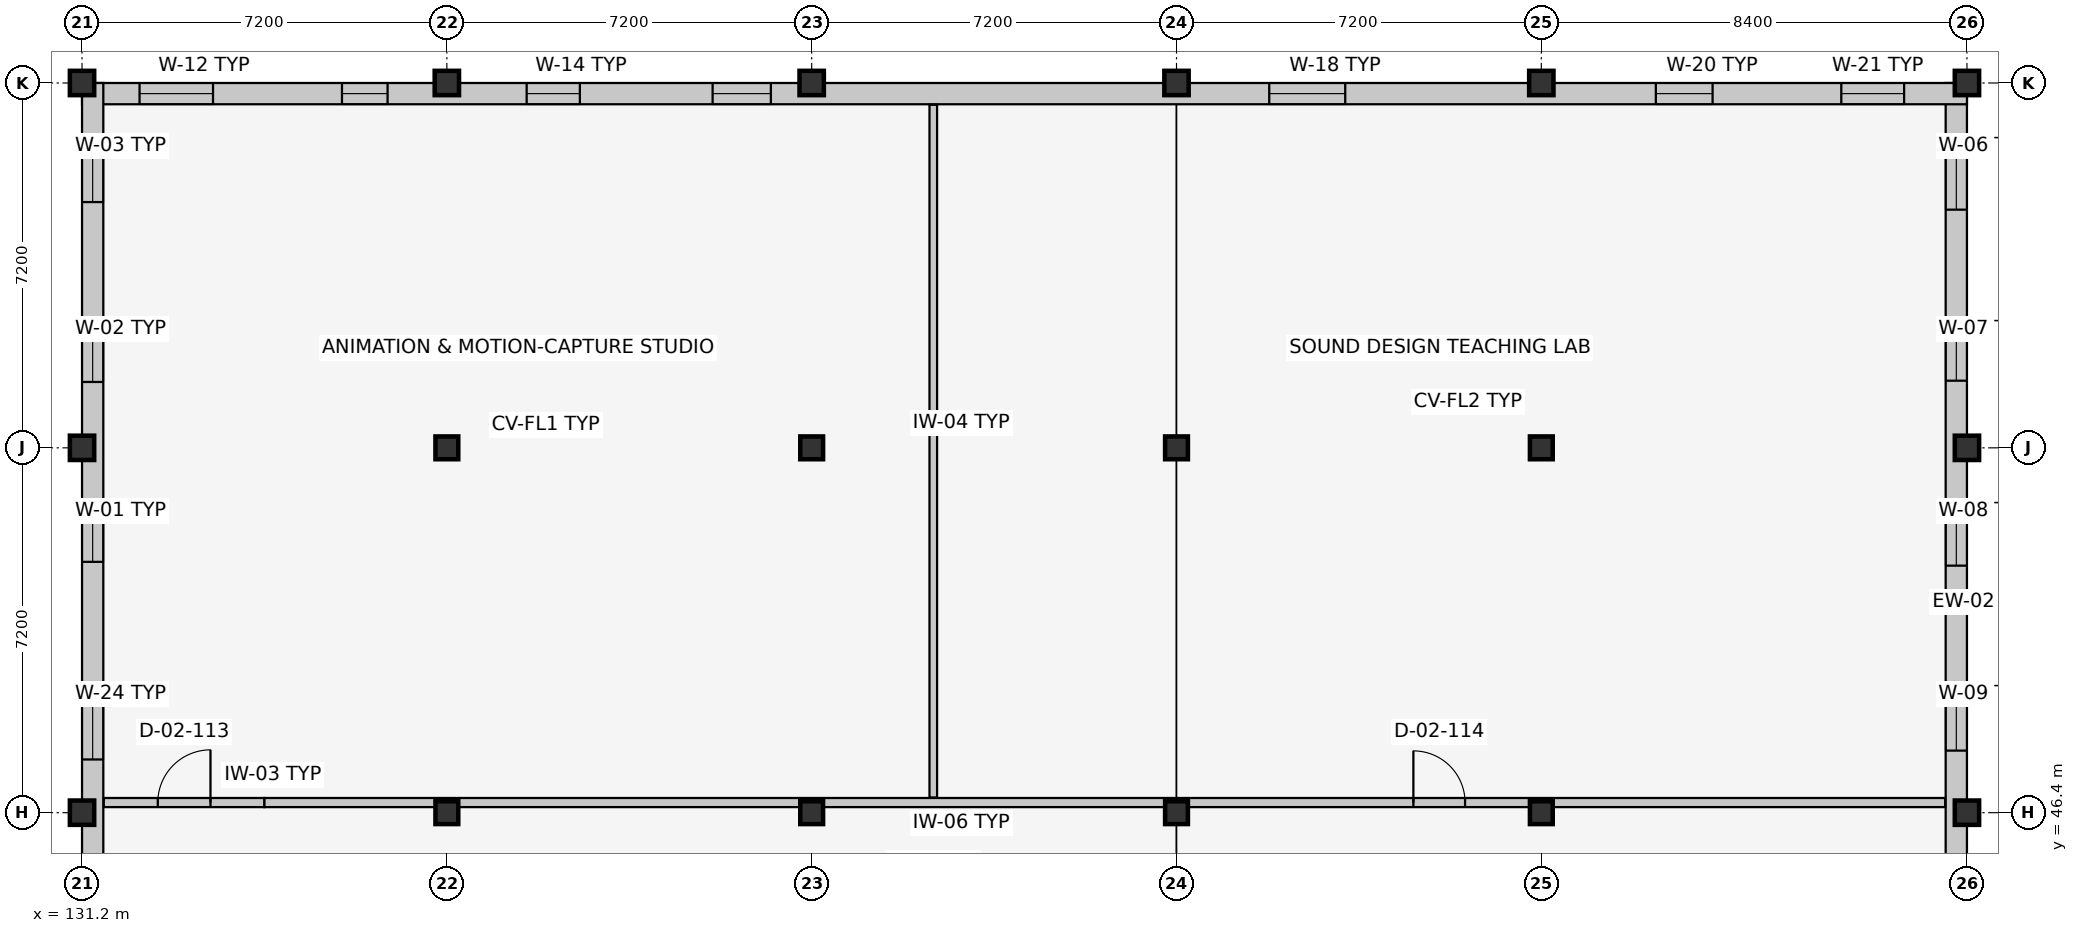
"""IFC4 building model, lengths in metres.
Left out: names, types, materials, properties, quantities, classifications, styles, units other than length and angle.
Written with IfcOpenShell. Run it as: python <this file> out.ifc"""

import sys

from ifc_helpers import new_model, si_unit, direction, frame, frame_2d, origin, origin_2d, place, context, subcontext, project, spatial, rectangle, extrude, element, fill, save


model = new_model("IFC4")
c1 = context("Model", 3, precision=1e-05, world=origin(), true_north=direction((0.0, 1.0)))
c2 = subcontext(c1, "Body", "Model", "MODEL_VIEW")
j1 = project(units=[si_unit("LENGTHUNIT", "METRE"), si_unit("PLANEANGLEUNIT", "RADIAN")], contexts=[c1])
p1 = place(None, origin())
s1 = spatial("IfcSite", under=j1, at=p1, CompositionType="ELEMENT")
p2 = place(p1, origin())
s2 = spatial("IfcBuilding", under=s1, at=p2, CompositionType="ELEMENT")
p3 = place(p2, frame((0.0, 0.0, 9.6)))
s3 = spatial("IfcBuildingStorey", under=s2, at=p3, CompositionType="ELEMENT", Elevation=9.6)
for number, where, z_axis, x_axis in (
    (1, (131.2, 46.4, 0.0), (0.0, 0.0, 1.0), (1.0, 0.0, 0.0)),
    (2, (131.2, 53.6, 0.0), (0.0, 0.0, 1.0), (1.0, 0.0, 0.0)),
    (3, (131.2, 60.8, 0.0), (0.0, 0.0, 1.0), (1.0, 0.0, 0.0)),
):
    element("IfcColumn", number, at=place(p3, frame(where, z_axis=z_axis, x_axis=x_axis)), inside=s3, PredefinedType="COLUMN", context=c2, shape_type="SweptSolid", body=[
        extrude(rectangle(XDim=0.48, YDim=0.48, at=origin_2d()), origin(), (0.0, 0.0, 1.0), 4.2),
    ])
for number, where, z_axis, x_axis in (
    (4, (138.4, 46.4, 0.0), (0.0, 0.0, 1.0), (1.0, 0.0, 0.0)),
    (5, (138.4, 53.6, 0.0), (0.0, 0.0, 1.0), (1.0, 0.0, 0.0)),
):
    element("IfcColumn", number, at=place(p3, frame(where, z_axis=z_axis, x_axis=x_axis)), inside=s3, PredefinedType="COLUMN", context=c2, shape_type="SweptSolid", body=[
        extrude(rectangle(XDim=0.45, YDim=0.45, at=origin_2d()), origin(), (0.0, 0.0, 1.0), 4.2),
    ])
p4 = place(p3, frame((138.4, 60.8, 0.0), z_axis=(0.0, 0.0, 1.0), x_axis=(1.0, 0.0, 0.0)))
e6 = element("IfcColumn", 6, at=p4, inside=s3, PredefinedType="COLUMN", context=c2, shape_type="SweptSolid", body=[
    extrude(rectangle(XDim=0.48, YDim=0.48, at=origin_2d()), origin(), (0.0, 0.0, 1.0), 4.2),
])
for number, where, z_axis, x_axis in (
    (7, (145.6, 46.4, 0.0), (0.0, 0.0, 1.0), (1.0, 0.0, 0.0)),
    (8, (145.6, 53.6, 0.0), (0.0, 0.0, 1.0), (1.0, 0.0, 0.0)),
):
    element("IfcColumn", number, at=place(p3, frame(where, z_axis=z_axis, x_axis=x_axis)), inside=s3, PredefinedType="COLUMN", context=c2, shape_type="SweptSolid", body=[
        extrude(rectangle(XDim=0.45, YDim=0.45, at=origin_2d()), origin(), (0.0, 0.0, 1.0), 4.2),
    ])
p5 = place(p3, frame((145.6, 60.8, 0.0), z_axis=(0.0, 0.0, 1.0), x_axis=(1.0, 0.0, 0.0)))
e9 = element("IfcColumn", 9, at=p5, inside=s3, PredefinedType="COLUMN", context=c2, shape_type="SweptSolid", body=[
    extrude(rectangle(XDim=0.48, YDim=0.48, at=origin_2d()), origin(), (0.0, 0.0, 1.0), 4.2),
])
for number, where, z_axis, x_axis in (
    (10, (152.8, 46.4, 0.0), (0.0, 0.0, 1.0), (1.0, 0.0, 0.0)),
    (11, (152.8, 53.6, 0.0), (0.0, 0.0, 1.0), (1.0, 0.0, 0.0)),
):
    element("IfcColumn", number, at=place(p3, frame(where, z_axis=z_axis, x_axis=x_axis)), inside=s3, PredefinedType="COLUMN", context=c2, shape_type="SweptSolid", body=[
        extrude(rectangle(XDim=0.45, YDim=0.45, at=origin_2d()), origin(), (0.0, 0.0, 1.0), 4.2),
    ])
p6 = place(p3, frame((152.8, 60.8, 0.0), z_axis=(0.0, 0.0, 1.0), x_axis=(1.0, 0.0, 0.0)))
e12 = element("IfcColumn", 12, at=p6, inside=s3, PredefinedType="COLUMN", context=c2, shape_type="SweptSolid", body=[
    extrude(rectangle(XDim=0.48, YDim=0.48, at=origin_2d()), origin(), (0.0, 0.0, 1.0), 4.2),
])
for number, where, z_axis, x_axis in (
    (13, (160.0, 46.4, 0.0), (0.0, 0.0, 1.0), (1.0, 0.0, 0.0)),
    (14, (160.0, 53.6, 0.0), (0.0, 0.0, 1.0), (1.0, 0.0, 0.0)),
):
    element("IfcColumn", number, at=place(p3, frame(where, z_axis=z_axis, x_axis=x_axis)), inside=s3, PredefinedType="COLUMN", context=c2, shape_type="SweptSolid", body=[
        extrude(rectangle(XDim=0.45, YDim=0.45, at=origin_2d()), origin(), (0.0, 0.0, 1.0), 4.2),
    ])
for number, where, z_axis, x_axis in (
    (15, (160.0, 60.8, 0.0), (0.0, 0.0, 1.0), (1.0, 0.0, 0.0)),
    (16, (168.4, 46.4, 0.0), (0.0, 0.0, 1.0), (1.0, 0.0, 0.0)),
    (17, (168.4, 53.6, 0.0), (0.0, 0.0, 1.0), (1.0, 0.0, 0.0)),
    (18, (168.4, 60.8, 0.0), (0.0, 0.0, 1.0), (1.0, 0.0, 0.0)),
):
    element("IfcColumn", number, at=place(p3, frame(where, z_axis=z_axis, x_axis=x_axis)), inside=s3, PredefinedType="COLUMN", context=c2, shape_type="SweptSolid", body=[
        extrude(rectangle(XDim=0.48, YDim=0.48, at=origin_2d()), origin(), (0.0, 0.0, 1.0), 4.2),
    ])
p7 = place(p3, frame((168.19, 60.8, 0.0), z_axis=(0.0, 0.0, 1.0), x_axis=(0.0, -1.0, 0.0)))
e19 = element("IfcWall", 19, at=p7, inside=s3, PredefinedType="SOLIDWALL", context=c2, shape_type="SweptSolid", body=[
    extrude(rectangle(XDim=21.6, YDim=0.42, at=frame_2d((10.8, 0.0))), origin(), (0.0, 0.0, 1.0), 3.355),
])
p8 = place(p7, frame((1.1, 0.0, 0.9)))
e20 = element("IfcOpeningElement", 20, at=p8, cuts=e19, PredefinedType="OPENING", context=c2, shape_type="SweptSolid", body=[
    extrude(rectangle(XDim=1.4, YDim=1.35, at=frame_2d((0.7, 0.675))), frame((0.0, 0.222, 0.0), z_axis=(0.0, -1.0, 0.0), x_axis=(1.0, 0.0, 0.0)), (0.0, 0.0, 1.0), 0.444),
])
p9 = place(p7, frame((4.925, 0.0, 0.9)))
e21 = element("IfcOpeningElement", 21, at=p9, cuts=e19, PredefinedType="OPENING", context=c2, shape_type="SweptSolid", body=[
    extrude(rectangle(XDim=0.95, YDim=1.45, at=frame_2d((0.475, 0.725))), frame((0.0, 0.222, 0.0), z_axis=(0.0, -1.0, 0.0), x_axis=(1.0, 0.0, 0.0)), (0.0, 0.0, 1.0), 0.444),
])
p10 = place(p7, frame((8.475, 0.0, 0.9)))
e22 = element("IfcOpeningElement", 22, at=p10, cuts=e19, PredefinedType="OPENING", context=c2, shape_type="SweptSolid", body=[
    extrude(rectangle(XDim=1.05, YDim=1.45, at=frame_2d((0.525, 0.725))), frame((0.0, 0.222, 0.0), z_axis=(0.0, -1.0, 0.0), x_axis=(1.0, 0.0, 0.0)), (0.0, 0.0, 1.0), 0.444),
])
p11 = place(p7, frame((12.025, 0.0, 0.9)))
e23 = element("IfcOpeningElement", 23, at=p11, cuts=e19, PredefinedType="OPENING", context=c2, shape_type="SweptSolid", body=[
    extrude(rectangle(XDim=1.15, YDim=1.45, at=frame_2d((0.575, 0.725))), frame((0.0, 0.222, 0.0), z_axis=(0.0, -1.0, 0.0), x_axis=(1.0, 0.0, 0.0)), (0.0, 0.0, 1.0), 0.444),
])
p12 = place(p7, frame((19.125, 0.0, 0.9)))
e24 = element("IfcOpeningElement", 24, at=p12, cuts=e19, PredefinedType="OPENING", context=c2, shape_type="SweptSolid", body=[
    extrude(rectangle(XDim=1.35, YDim=1.45, at=frame_2d((0.675, 0.725))), frame((0.0, 0.222, 0.0), z_axis=(0.0, -1.0, 0.0), x_axis=(1.0, 0.0, 0.0)), (0.0, 0.0, 1.0), 0.444),
])
p13 = place(p3, frame((131.2, 60.59, 0.0), z_axis=(0.0, 0.0, 1.0), x_axis=(1.0, 0.0, 0.0)))
e25 = element("IfcWall", 25, at=p13, inside=s3, PredefinedType="SOLIDWALL", context=c2, shape_type="SweptSolid", body=[
    extrude(rectangle(XDim=37.2, YDim=0.42, at=frame_2d((18.6, 0.0))), origin(), (0.0, 0.0, 1.0), 3.115),
])
p14 = place(p13, frame((1.135, 0.0, 0.9)))
e26 = element("IfcOpeningElement", 26, at=p14, cuts=e25, PredefinedType="OPENING", context=c2, shape_type="SweptSolid", body=[
    extrude(rectangle(XDim=1.45, YDim=1.45, at=frame_2d((0.725, 0.725))), frame((0.0, 0.222, 0.0), z_axis=(0.0, -1.0, 0.0), x_axis=(1.0, 0.0, 0.0)), (0.0, 0.0, 1.0), 0.444),
])
p15 = place(p13, frame((5.13, 0.0, 0.9)))
e27 = element("IfcOpeningElement", 27, at=p15, cuts=e25, PredefinedType="OPENING", context=c2, shape_type="SweptSolid", body=[
    extrude(rectangle(XDim=0.9, YDim=1.6, at=frame_2d((0.45, 0.8))), frame((0.0, 0.222, 0.0), z_axis=(0.0, -1.0, 0.0), x_axis=(1.0, 0.0, 0.0)), (0.0, 0.0, 1.0), 0.444),
])
p16 = place(p13, frame((8.775, 0.0, 0.9)))
e28 = element("IfcOpeningElement", 28, at=p16, cuts=e25, PredefinedType="OPENING", context=c2, shape_type="SweptSolid", body=[
    extrude(rectangle(XDim=1.05, YDim=1.6, at=frame_2d((0.525, 0.8))), frame((0.0, 0.222, 0.0), z_axis=(0.0, -1.0, 0.0), x_axis=(1.0, 0.0, 0.0)), (0.0, 0.0, 1.0), 0.444),
])
p17 = place(p13, frame((12.445, 0.0, 0.9)))
e29 = element("IfcOpeningElement", 29, at=p17, cuts=e25, PredefinedType="OPENING", context=c2, shape_type="SweptSolid", body=[
    extrude(rectangle(XDim=1.15, YDim=1.6, at=frame_2d((0.575, 0.8))), frame((0.0, 0.222, 0.0), z_axis=(0.0, -1.0, 0.0), x_axis=(1.0, 0.0, 0.0)), (0.0, 0.0, 1.0), 0.444),
])
p18 = place(p13, frame((23.43, 0.0, 0.9)))
e30 = element("IfcOpeningElement", 30, at=p18, cuts=e25, PredefinedType="OPENING", context=c2, shape_type="SweptSolid", body=[
    extrude(rectangle(XDim=1.5, YDim=1.6, at=frame_2d((0.75, 0.8))), frame((0.0, 0.222, 0.0), z_axis=(0.0, -1.0, 0.0), x_axis=(1.0, 0.0, 0.0)), (0.0, 0.0, 1.0), 0.444),
])
p19 = place(p13, frame((31.06, 0.0, 0.9)))
e31 = element("IfcOpeningElement", 31, at=p19, cuts=e25, PredefinedType="OPENING", context=c2, shape_type="SweptSolid", body=[
    extrude(rectangle(XDim=1.12, YDim=1.75, at=frame_2d((0.56, 0.875))), frame((0.0, 0.222, 0.0), z_axis=(0.0, -1.0, 0.0), x_axis=(1.0, 0.0, 0.0)), (0.0, 0.0, 1.0), 0.444),
])
p20 = place(p13, frame((34.72, 0.0, 0.9)))
e32 = element("IfcOpeningElement", 32, at=p20, cuts=e25, PredefinedType="OPENING", context=c2, shape_type="SweptSolid", body=[
    extrude(rectangle(XDim=1.24, YDim=1.75, at=frame_2d((0.62, 0.875))), frame((0.0, 0.222, 0.0), z_axis=(0.0, -1.0, 0.0), x_axis=(1.0, 0.0, 0.0)), (0.0, 0.0, 1.0), 0.444),
])
p21 = place(p3, frame((131.41, 39.2, 0.0), z_axis=(0.0, 0.0, 1.0), x_axis=(0.0, 1.0, 0.0)))
e33 = element("IfcWall", 33, at=p21, inside=s3, PredefinedType="SOLIDWALL", context=c2, shape_type="SweptSolid", body=[
    extrude(rectangle(XDim=21.6, YDim=0.42, at=frame_2d((10.8, 0.0))), origin(), (0.0, 0.0, 1.0), 3.355),
])
p22 = place(p21, frame((1.13, 0.0, 0.9)))
e34 = element("IfcOpeningElement", 34, at=p22, cuts=e33, PredefinedType="OPENING", context=c2, shape_type="SweptSolid", body=[
    extrude(rectangle(XDim=1.34, YDim=1.75, at=frame_2d((0.67, 0.875))), frame((0.0, 0.222, 0.0), z_axis=(0.0, -1.0, 0.0), x_axis=(1.0, 0.0, 0.0)), (0.0, 0.0, 1.0), 0.444),
])
p23 = place(p21, frame((4.68, 0.0, 0.9)))
e35 = element("IfcOpeningElement", 35, at=p23, cuts=e33, PredefinedType="OPENING", context=c2, shape_type="SweptSolid", body=[
    extrude(rectangle(XDim=1.44, YDim=1.75, at=frame_2d((0.72, 0.875))), frame((0.0, 0.222, 0.0), z_axis=(0.0, -1.0, 0.0), x_axis=(1.0, 0.0, 0.0)), (0.0, 0.0, 1.0), 0.444),
])
p24 = place(p21, frame((8.25, 0.0, 0.9)))
e36 = element("IfcOpeningElement", 36, at=p24, cuts=e33, PredefinedType="OPENING", context=c2, shape_type="SweptSolid", body=[
    extrude(rectangle(XDim=1.5, YDim=1.75, at=frame_2d((0.75, 0.875))), frame((0.0, 0.222, 0.0), z_axis=(0.0, -1.0, 0.0), x_axis=(1.0, 0.0, 0.0)), (0.0, 0.0, 1.0), 0.444),
])
p25 = place(p21, frame((12.15, 0.0, 0.9)))
e37 = element("IfcOpeningElement", 37, at=p25, cuts=e33, PredefinedType="OPENING", context=c2, shape_type="SweptSolid", body=[
    extrude(rectangle(XDim=0.9, YDim=1.35, at=frame_2d((0.45, 0.675))), frame((0.0, 0.222, 0.0), z_axis=(0.0, -1.0, 0.0), x_axis=(1.0, 0.0, 0.0)), (0.0, 0.0, 1.0), 0.444),
])
p26 = place(p21, frame((15.7, 0.0, 0.9)))
e38 = element("IfcOpeningElement", 38, at=p26, cuts=e33, PredefinedType="OPENING", context=c2, shape_type="SweptSolid", body=[
    extrude(rectangle(XDim=1.0, YDim=1.35, at=frame_2d((0.5, 0.675))), frame((0.0, 0.222, 0.0), z_axis=(0.0, -1.0, 0.0), x_axis=(1.0, 0.0, 0.0)), (0.0, 0.0, 1.0), 0.444),
])
p27 = place(p21, frame((19.25, 0.0, 0.9)))
e39 = element("IfcOpeningElement", 39, at=p27, cuts=e33, PredefinedType="OPENING", context=c2, shape_type="SweptSolid", body=[
    extrude(rectangle(XDim=1.1, YDim=1.35, at=frame_2d((0.55, 0.675))), frame((0.0, 0.222, 0.0), z_axis=(0.0, -1.0, 0.0), x_axis=(1.0, 0.0, 0.0)), (0.0, 0.0, 1.0), 0.444),
])
p28 = place(p3, frame((131.63, 46.6, 0.0), z_axis=(0.0, 0.0, 1.0), x_axis=(1.0, 0.0, 0.0)))
e40 = element("IfcWall", 40, at=p28, inside=s3, PredefinedType="PARTITIONING", context=c2, shape_type="SweptSolid", body=[
    extrude(rectangle(XDim=3.17, YDim=0.18, at=frame_2d((1.585, 0.0))), origin(), (0.0, 0.0, 1.0), 3.285),
])
p29 = place(p28, frame((1.065, 0.0, 0.0)))
e41 = element("IfcOpeningElement", 41, at=p29, cuts=e40, PredefinedType="OPENING", context=c2, shape_type="SweptSolid", body=[
    extrude(rectangle(XDim=1.04, YDim=2.15, at=frame_2d((0.52, 1.075))), frame((0.0, 0.102, 0.0), z_axis=(0.0, -1.0, 0.0), x_axis=(1.0, 0.0, 0.0)), (0.0, 0.0, 1.0), 0.204),
])
p30 = place(p3, frame((134.8, 46.6, 0.0), z_axis=(0.0, 0.0, 1.0), x_axis=(1.0, 0.0, 0.0)))
e42 = element("IfcWall", 42, at=p30, inside=s3, PredefinedType="PARTITIONING", context=c2, shape_type="SweptSolid", body=[
    extrude(rectangle(XDim=33.17, YDim=0.18, at=frame_2d((16.585, 0.0))), origin(), (0.0, 0.0, 1.0), 2.835),
])
p31 = place(p30, frame((22.675, 0.0, 0.0)))
e43 = element("IfcOpeningElement", 43, at=p31, cuts=e42, PredefinedType="OPENING", context=c2, shape_type="SweptSolid", body=[
    extrude(rectangle(XDim=1.02, YDim=2.12, at=frame_2d((0.51, 1.06))), frame((0.0, 0.102, 0.0), z_axis=(0.0, -1.0, 0.0), x_axis=(1.0, 0.0, 0.0)), (0.0, 0.0, 1.0), 0.204),
])
p32 = place(p3, frame((148.0, 46.7, 0.0), z_axis=(0.0, 0.0, 1.0), x_axis=(0.0, 1.0, 0.0)))
e44 = element("IfcWall", 44, at=p32, inside=s3, PredefinedType="PARTITIONING", context=c2, shape_type="SweptSolid", body=[
    extrude(rectangle(XDim=13.67, YDim=0.15, at=frame_2d((6.835, 0.0))), origin(), (0.0, 0.0, 1.0), 3.96),
])
p33 = place(p8, origin())
e45 = element("IfcWindow", 45, at=p33, inside=s3, PartitioningType="SINGLE_PANEL", PredefinedType="WINDOW", context=c2, shape_type="SweptSolid", body=[
    extrude(rectangle(XDim=1.4, YDim=1.35, at=frame_2d((0.7, 0.675))), frame((0.0, 0.03, 0.0), z_axis=(0.0, -1.0, 0.0), x_axis=(1.0, 0.0, 0.0)), (0.0, 0.0, 1.0), 0.06),
])
fill(e20, e45)
p34 = place(p9, origin())
e46 = element("IfcWindow", 46, at=p34, inside=s3, PartitioningType="SINGLE_PANEL", PredefinedType="WINDOW", context=c2, shape_type="SweptSolid", body=[
    extrude(rectangle(XDim=0.95, YDim=1.45, at=frame_2d((0.475, 0.725))), frame((0.0, 0.03, 0.0), z_axis=(0.0, -1.0, 0.0), x_axis=(1.0, 0.0, 0.0)), (0.0, 0.0, 1.0), 0.06),
])
fill(e21, e46)
p35 = place(p10, origin())
e47 = element("IfcWindow", 47, at=p35, inside=s3, PartitioningType="SINGLE_PANEL", PredefinedType="WINDOW", context=c2, shape_type="SweptSolid", body=[
    extrude(rectangle(XDim=1.05, YDim=1.45, at=frame_2d((0.525, 0.725))), frame((0.0, 0.03, 0.0), z_axis=(0.0, -1.0, 0.0), x_axis=(1.0, 0.0, 0.0)), (0.0, 0.0, 1.0), 0.06),
])
fill(e22, e47)
p36 = place(p11, origin())
e48 = element("IfcWindow", 48, at=p36, inside=s3, PartitioningType="SINGLE_PANEL", PredefinedType="WINDOW", context=c2, shape_type="SweptSolid", body=[
    extrude(rectangle(XDim=1.15, YDim=1.45, at=frame_2d((0.575, 0.725))), frame((0.0, 0.03, 0.0), z_axis=(0.0, -1.0, 0.0), x_axis=(1.0, 0.0, 0.0)), (0.0, 0.0, 1.0), 0.06),
])
fill(e23, e48)
p37 = place(p14, origin())
e49 = element("IfcWindow", 49, at=p37, inside=s3, PartitioningType="SINGLE_PANEL", PredefinedType="WINDOW", context=c2, shape_type="SweptSolid", body=[
    extrude(rectangle(XDim=1.45, YDim=1.45, at=frame_2d((0.725, 0.725))), frame((0.0, 0.03, 0.0), z_axis=(0.0, -1.0, 0.0), x_axis=(1.0, 0.0, 0.0)), (0.0, 0.0, 1.0), 0.06),
])
fill(e26, e49)
p38 = place(p15, origin())
e50 = element("IfcWindow", 50, at=p38, inside=s3, PartitioningType="SINGLE_PANEL", PredefinedType="WINDOW", context=c2, shape_type="SweptSolid", body=[
    extrude(rectangle(XDim=0.9, YDim=1.6, at=frame_2d((0.45, 0.8))), frame((0.0, 0.03, 0.0), z_axis=(0.0, -1.0, 0.0), x_axis=(1.0, 0.0, 0.0)), (0.0, 0.0, 1.0), 0.06),
])
fill(e27, e50)
p39 = place(p16, origin())
e51 = element("IfcWindow", 51, at=p39, inside=s3, PartitioningType="SINGLE_PANEL", PredefinedType="WINDOW", context=c2, shape_type="SweptSolid", body=[
    extrude(rectangle(XDim=1.05, YDim=1.6, at=frame_2d((0.525, 0.8))), frame((0.0, 0.03, 0.0), z_axis=(0.0, -1.0, 0.0), x_axis=(1.0, 0.0, 0.0)), (0.0, 0.0, 1.0), 0.06),
])
fill(e28, e51)
p40 = place(p17, origin())
e52 = element("IfcWindow", 52, at=p40, inside=s3, PartitioningType="SINGLE_PANEL", PredefinedType="WINDOW", context=c2, shape_type="SweptSolid", body=[
    extrude(rectangle(XDim=1.15, YDim=1.6, at=frame_2d((0.575, 0.8))), frame((0.0, 0.03, 0.0), z_axis=(0.0, -1.0, 0.0), x_axis=(1.0, 0.0, 0.0)), (0.0, 0.0, 1.0), 0.06),
])
fill(e29, e52)
p41 = place(p18, origin())
e53 = element("IfcWindow", 53, at=p41, inside=s3, PartitioningType="SINGLE_PANEL", PredefinedType="WINDOW", context=c2, shape_type="SweptSolid", body=[
    extrude(rectangle(XDim=1.5, YDim=1.6, at=frame_2d((0.75, 0.8))), frame((0.0, 0.03, 0.0), z_axis=(0.0, -1.0, 0.0), x_axis=(1.0, 0.0, 0.0)), (0.0, 0.0, 1.0), 0.06),
])
fill(e30, e53)
p42 = place(p19, origin())
e54 = element("IfcWindow", 54, at=p42, inside=s3, PartitioningType="SINGLE_PANEL", PredefinedType="WINDOW", context=c2, shape_type="SweptSolid", body=[
    extrude(rectangle(XDim=1.12, YDim=1.75, at=frame_2d((0.56, 0.875))), frame((0.0, 0.03, 0.0), z_axis=(0.0, -1.0, 0.0), x_axis=(1.0, 0.0, 0.0)), (0.0, 0.0, 1.0), 0.06),
])
fill(e31, e54)
p43 = place(p20, origin())
e55 = element("IfcWindow", 55, at=p43, inside=s3, PartitioningType="SINGLE_PANEL", PredefinedType="WINDOW", context=c2, shape_type="SweptSolid", body=[
    extrude(rectangle(XDim=1.24, YDim=1.75, at=frame_2d((0.62, 0.875))), frame((0.0, 0.03, 0.0), z_axis=(0.0, -1.0, 0.0), x_axis=(1.0, 0.0, 0.0)), (0.0, 0.0, 1.0), 0.06),
])
fill(e32, e55)
p44 = place(p24, origin())
e56 = element("IfcWindow", 56, at=p44, inside=s3, PartitioningType="SINGLE_PANEL", PredefinedType="WINDOW", context=c2, shape_type="SweptSolid", body=[
    extrude(rectangle(XDim=1.5, YDim=1.75, at=frame_2d((0.75, 0.875))), frame((0.0, 0.03, 0.0), z_axis=(0.0, -1.0, 0.0), x_axis=(1.0, 0.0, 0.0)), (0.0, 0.0, 1.0), 0.06),
])
fill(e36, e56)
p45 = place(p25, origin())
e57 = element("IfcWindow", 57, at=p45, inside=s3, PartitioningType="SINGLE_PANEL", PredefinedType="WINDOW", context=c2, shape_type="SweptSolid", body=[
    extrude(rectangle(XDim=0.9, YDim=1.35, at=frame_2d((0.45, 0.675))), frame((0.0, 0.03, 0.0), z_axis=(0.0, -1.0, 0.0), x_axis=(1.0, 0.0, 0.0)), (0.0, 0.0, 1.0), 0.06),
])
fill(e37, e57)
p46 = place(p26, origin())
e58 = element("IfcWindow", 58, at=p46, inside=s3, PartitioningType="SINGLE_PANEL", PredefinedType="WINDOW", context=c2, shape_type="SweptSolid", body=[
    extrude(rectangle(XDim=1.0, YDim=1.35, at=frame_2d((0.5, 0.675))), frame((0.0, 0.03, 0.0), z_axis=(0.0, -1.0, 0.0), x_axis=(1.0, 0.0, 0.0)), (0.0, 0.0, 1.0), 0.06),
])
fill(e38, e58)
p47 = place(p27, origin())
e59 = element("IfcWindow", 59, at=p47, inside=s3, PartitioningType="SINGLE_PANEL", PredefinedType="WINDOW", context=c2, shape_type="SweptSolid", body=[
    extrude(rectangle(XDim=1.1, YDim=1.35, at=frame_2d((0.55, 0.675))), frame((0.0, 0.03, 0.0), z_axis=(0.0, -1.0, 0.0), x_axis=(1.0, 0.0, 0.0)), (0.0, 0.0, 1.0), 0.06),
])
fill(e39, e59)
p48 = place(p29, origin())
e60 = element("IfcDoor", 60, at=p48, inside=s3, OperationType="SINGLE_SWING_RIGHT", PredefinedType="DOOR", context=c2, shape_type="SweptSolid", body=[
    extrude(rectangle(XDim=1.04, YDim=2.15, at=frame_2d((0.52, 1.075))), frame((0.0, 0.025, 0.0), z_axis=(0.0, -1.0, 0.0), x_axis=(1.0, 0.0, 0.0)), (0.0, 0.0, 1.0), 0.05),
])
fill(e41, e60)
p49 = place(p31, origin())
e61 = element("IfcDoor", 61, at=p49, inside=s3, OperationType="SINGLE_SWING_LEFT", PredefinedType="DOOR", context=c2, shape_type="SweptSolid", body=[
    extrude(rectangle(XDim=1.02, YDim=2.12, at=frame_2d((0.51, 1.06))), frame((0.0, 0.025, 0.0), z_axis=(0.0, -1.0, 0.0), x_axis=(1.0, 0.0, 0.0)), (0.0, 0.0, 1.0), 0.05),
])
fill(e43, e61)
save(model, sys.argv[1])
